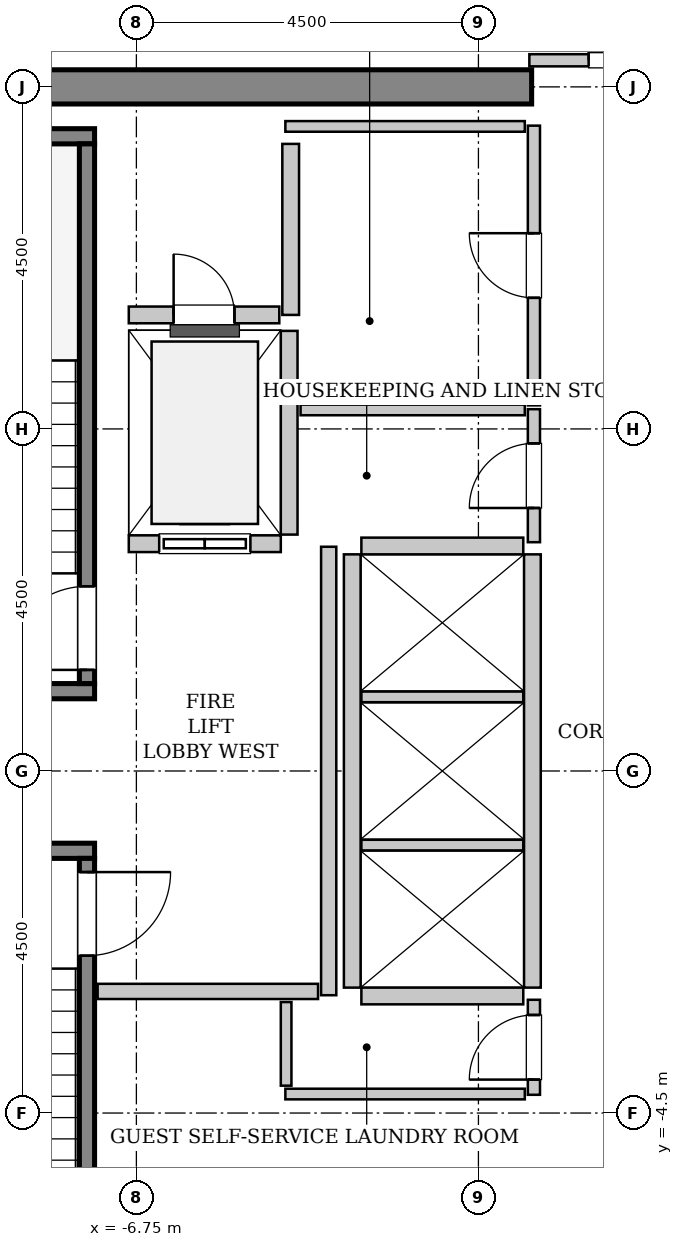
"""IFC4 building model, lengths in metres.
Left out: names, types, materials, properties, quantities, classifications, styles, units other than length and angle.
Written with IfcOpenShell. Run it as: python <this file> out.ifc"""

import sys

from ifc_helpers import new_model, si_unit, direction, frame, frame_2d, origin, place, context, subcontext, project, spatial, rectangle, extrude, source, transform, mapped, element, fill, save


model = new_model("IFC4")
c1 = context("Model", 3, precision=1e-05, world=origin(), true_north=direction((0.0, 1.0)))
c2 = subcontext(c1, "Body", "Model", "MODEL_VIEW")
j1 = project(units=[si_unit("LENGTHUNIT", "METRE"), si_unit("PLANEANGLEUNIT", "RADIAN")], contexts=[c1])
p1 = place(None, origin())
s1 = spatial("IfcSite", under=j1, at=p1, CompositionType="ELEMENT")
p2 = place(p1, origin())
s2 = spatial("IfcBuilding", under=s1, at=p2, CompositionType="ELEMENT")
p3 = place(p2, frame((0.0, 0.0, 252.2)))
s3 = spatial("IfcBuildingStorey", under=s2, at=p3, CompositionType="ELEMENT", Elevation=252.2)
m1 = source(origin(), c2, "Body", "SweptSolid", [
    extrude(rectangle(XDim=9.925, YDim=0.45, at=frame_2d((4.962, 0.0))), origin(), (0.0, 0.0, 1.0), 3.8),
])
p4 = place(p3, frame((-11.475, 9.0, 0.0), z_axis=(0.0, 0.0, 1.0), x_axis=(1.0, 0.0, 0.0)))
e1 = element("IfcWall", 1, at=p4, inside=s3, PredefinedType="SHEAR", context=c2, shape_type="MappedRepresentation", body=[
    mapped(m1, transform((0.0, 0.0, 0.0), x_axis=(1.0, 0.0, 0.0), y_axis=(0.0, 1.0, 0.0), z_axis=(0.0, 0.0, 1.0), scale=1.0)),
])
m2 = source(origin(), c2, "Body", "SweptSolid", [
    extrude(rectangle(XDim=3.4, YDim=0.2, at=frame_2d((1.7, 0.0))), origin(), (0.0, 0.0, 1.0), 3.8),
])
p5 = place(p3, frame((-7.3, 1.05, 0.0), z_axis=(0.0, 0.0, 1.0), x_axis=(-1.0, 0.0, 0.0)))
e2 = element("IfcWall", 2, at=p5, inside=s3, PredefinedType="SOLIDWALL", context=c2, shape_type="MappedRepresentation", body=[
    mapped(m2, transform((0.0, 0.0, 0.0), x_axis=(1.0, 0.0, 0.0), y_axis=(0.0, 1.0, 0.0), z_axis=(0.0, 0.0, 1.0), scale=1.0)),
])
m3 = source(origin(), c2, "Body", "SweptSolid", [
    extrude(rectangle(XDim=3.73, YDim=0.2, at=frame_2d((1.865, 0.0))), origin(), (0.0, 0.0, 1.0), 3.8),
])
p6 = place(p3, frame((-7.3, 8.35, 0.0), z_axis=(0.0, 0.0, 1.0), x_axis=(-1.0, 0.0, 0.0)))
e3 = element("IfcWall", 3, at=p6, inside=s3, PredefinedType="SOLIDWALL", context=c2, shape_type="MappedRepresentation", body=[
    mapped(m3, transform((0.0, 0.0, 0.0), x_axis=(1.0, 0.0, 0.0), y_axis=(0.0, 1.0, 0.0), z_axis=(0.0, 0.0, 1.0), scale=1.0)),
])
m4 = source(origin(), c2, "Body", "SweptSolid", [
    extrude(rectangle(XDim=7.1, YDim=0.2, at=frame_2d((3.55, 0.0))), origin(), (0.0, 0.0, 1.0), 3.8),
])
p7 = place(p3, frame((-7.4, 1.15, 0.0), z_axis=(0.0, 0.0, 1.0), x_axis=(0.0, 1.0, 0.0)))
e4 = element("IfcWall", 4, at=p7, inside=s3, PredefinedType="SOLIDWALL", context=c2, shape_type="MappedRepresentation", body=[
    mapped(m4, transform((0.0, 0.0, 0.0), x_axis=(1.0, 0.0, 0.0), y_axis=(0.0, 1.0, 0.0), z_axis=(0.0, 0.0, 1.0), scale=1.0)),
])
p8 = place(p7, frame((0.18, 0.0, 0.0)))
e5 = element("IfcOpeningElement", 5, at=p8, cuts=e4, PredefinedType="OPENING", context=c2, shape_type="SweptSolid", body=[
    extrude(rectangle(XDim=1.1, YDim=2.15, at=frame_2d((0.55, 1.075))), frame((0.0, 0.11, 0.0), z_axis=(0.0, -1.0, 0.0), x_axis=(1.0, 0.0, 0.0)), (0.0, 0.0, 1.0), 0.22),
])
p9 = place(p3, frame((-10.7, -1.05, 0.0), z_axis=(0.0, 0.0, 1.0), x_axis=(1.0, 0.0, 0.0)))
e6 = element("IfcWall", 6, at=p9, inside=s3, PredefinedType="SOLIDWALL", context=c2, shape_type="MappedRepresentation", body=[
    mapped(m2, transform((0.0, 0.0, 0.0), x_axis=(1.0, 0.0, 0.0), y_axis=(0.0, 1.0, 0.0), z_axis=(0.0, 0.0, 1.0), scale=1.0)),
])
p10 = place(p3, frame((-7.4, -1.15, 0.0), z_axis=(0.0, 0.0, 1.0), x_axis=(0.0, -1.0, 0.0)))
e7 = element("IfcWall", 7, at=p10, inside=s3, PredefinedType="SOLIDWALL", context=c2, shape_type="MappedRepresentation", body=[
    mapped(m4, transform((0.0, 0.0, 0.0), x_axis=(1.0, 0.0, 0.0), y_axis=(0.0, 1.0, 0.0), z_axis=(0.0, 0.0, 1.0), scale=1.0)),
])
p11 = place(p10, frame((0.18, 0.0, 0.0)))
e8 = element("IfcOpeningElement", 8, at=p11, cuts=e7, PredefinedType="OPENING", context=c2, shape_type="SweptSolid", body=[
    extrude(rectangle(XDim=1.1, YDim=2.15, at=frame_2d((0.55, 1.075))), frame((0.0, 0.11, 0.0), z_axis=(0.0, -1.0, 0.0), x_axis=(1.0, 0.0, 0.0)), (0.0, 0.0, 1.0), 0.22),
])
m5 = source(origin(), c2, "Body", "SweptSolid", [
    extrude(rectangle(XDim=2.0, YDim=0.22, at=frame_2d((1.0, 0.0))), origin(), (0.0, 0.0, 1.0), 3.535),
])
p12 = place(p3, frame((-6.85, 2.99, 0.0), z_axis=(0.0, 0.0, 1.0), x_axis=(1.0, 0.0, 0.0)))
e9 = element("IfcWall", 9, at=p12, inside=s3, PredefinedType="SOLIDWALL", context=c2, shape_type="MappedRepresentation", body=[
    mapped(m5, transform((0.0, 0.0, 0.0), x_axis=(1.0, 0.0, 0.0), y_axis=(0.0, 1.0, 0.0), z_axis=(0.0, 0.0, 1.0), scale=1.0)),
])
p13 = place(p12, frame((0.4, 0.0, 0.0)))
e10 = element("IfcOpeningElement", 10, at=p13, cuts=e9, PredefinedType="OPENING", context=c2, shape_type="SweptSolid", body=[
    extrude(rectangle(XDim=1.2, YDim=2.2, at=frame_2d((0.6, 1.1))), frame((0.0, 0.12, 0.0), z_axis=(0.0, -1.0, 0.0), x_axis=(1.0, 0.0, 0.0)), (0.0, 0.0, 1.0), 0.24),
])
m6 = source(origin(), c2, "Body", "SweptSolid", [
    extrude(rectangle(XDim=2.68, YDim=0.22, at=frame_2d((1.34, 0.0))), origin(), (0.0, 0.0, 1.0), 3.535),
])
p14 = place(p3, frame((-4.74, 3.11, 0.0), z_axis=(0.0, 0.0, 1.0), x_axis=(0.0, 1.0, 0.0)))
e11 = element("IfcWall", 11, at=p14, inside=s3, PredefinedType="SOLIDWALL", context=c2, shape_type="MappedRepresentation", body=[
    mapped(m6, transform((0.0, 0.0, 0.0), x_axis=(1.0, 0.0, 0.0), y_axis=(0.0, 1.0, 0.0), z_axis=(0.0, 0.0, 1.0), scale=1.0)),
])
m7 = source(origin(), c2, "Body", "SweptSolid", [
    extrude(rectangle(XDim=5.7, YDim=0.22, at=frame_2d((2.85, 0.0))), origin(), (0.0, 0.0, 1.0), 3.535),
])
for number, where, z_axis, x_axis in (
    (12, (-1.54, -2.85, 0.0), (0.0, 0.0, 1.0), (0.0, 1.0, 0.0)),
    (13, (-3.91, 2.85, 0.0), (0.0, 0.0, 1.0), (0.0, -1.0, 0.0)),
):
    element("IfcWall", number, at=place(p3, frame(where, z_axis=z_axis, x_axis=x_axis)), inside=s3, PredefinedType="SOLIDWALL", context=c2, shape_type="MappedRepresentation", body=[
        mapped(m7, transform((0.0, 0.0, 0.0), x_axis=(1.0, 0.0, 0.0), y_axis=(0.0, 1.0, 0.0), z_axis=(0.0, 0.0, 1.0), scale=1.0)),
    ])
m8 = source(origin(), c2, "Body", "SweptSolid", [
    extrude(rectangle(XDim=2.13, YDim=0.22, at=frame_2d((1.065, 0.0))), origin(), (0.0, 0.0, 1.0), 3.535),
])
p15 = place(p3, frame((-3.79, -2.96, 0.0), z_axis=(0.0, 0.0, 1.0), x_axis=(1.0, 0.0, 0.0)))
e14 = element("IfcWall", 14, at=p15, inside=s3, PredefinedType="SOLIDWALL", context=c2, shape_type="MappedRepresentation", body=[
    mapped(m8, transform((0.0, 0.0, 0.0), x_axis=(1.0, 0.0, 0.0), y_axis=(0.0, 1.0, 0.0), z_axis=(0.0, 0.0, 1.0), scale=1.0)),
])
m9 = source(origin(), c2, "Body", "SweptSolid", [
    extrude(rectangle(XDim=2.13, YDim=0.14, at=frame_2d((1.065, 0.0))), origin(), (0.0, 0.0, 1.0), 3.535),
])
for number, where, z_axis, x_axis in (
    (15, (-3.79, -0.975, 0.0), (0.0, 0.0, 1.0), (1.0, 0.0, 0.0)),
    (16, (-3.79, 0.975, 0.0), (0.0, 0.0, 1.0), (1.0, 0.0, 0.0)),
):
    element("IfcWall", number, at=place(p3, frame(where, z_axis=z_axis, x_axis=x_axis)), inside=s3, PredefinedType="PARTITIONING", context=c2, shape_type="MappedRepresentation", body=[
        mapped(m9, transform((0.0, 0.0, 0.0), x_axis=(1.0, 0.0, 0.0), y_axis=(0.0, 1.0, 0.0), z_axis=(0.0, 0.0, 1.0), scale=1.0)),
    ])
p16 = place(p3, frame((-1.66, 2.96, 0.0), z_axis=(0.0, 0.0, 1.0), x_axis=(-1.0, 0.0, 0.0)))
e17 = element("IfcWall", 17, at=p16, inside=s3, PredefinedType="SOLIDWALL", context=c2, shape_type="MappedRepresentation", body=[
    mapped(m8, transform((0.0, 0.0, 0.0), x_axis=(1.0, 0.0, 0.0), y_axis=(0.0, 1.0, 0.0), z_axis=(0.0, 0.0, 1.0), scale=1.0)),
])
m10 = source(origin(), c2, "Body", "SweptSolid", [
    extrude(rectangle(XDim=2.25, YDim=0.22, at=frame_2d((1.125, 0.0))), origin(), (0.0, 0.0, 1.0), 3.535),
])
p17 = place(p3, frame((-4.72, 6.0, 0.0), z_axis=(0.0, 0.0, 1.0), x_axis=(0.0, 1.0, 0.0)))
e18 = element("IfcWall", 18, at=p17, inside=s3, PredefinedType="SOLIDWALL", context=c2, shape_type="MappedRepresentation", body=[
    mapped(m10, transform((0.0, 0.0, 0.0), x_axis=(1.0, 0.0, 0.0), y_axis=(0.0, 1.0, 0.0), z_axis=(0.0, 0.0, 1.0), scale=1.0)),
])
m11 = source(origin(), c2, "Body", "SweptSolid", [
    extrude(rectangle(XDim=1.98, YDim=0.22, at=frame_2d((0.99, 0.0))), origin(), (0.0, 0.0, 1.0), 3.535),
])
p18 = place(p3, frame((-6.85, 6.0, 0.0), z_axis=(0.0, 0.0, 1.0), x_axis=(1.0, 0.0, 0.0)))
e19 = element("IfcWall", 19, at=p18, inside=s3, PredefinedType="SOLIDWALL", context=c2, shape_type="MappedRepresentation", body=[
    mapped(m11, transform((0.0, 0.0, 0.0), x_axis=(1.0, 0.0, 0.0), y_axis=(0.0, 1.0, 0.0), z_axis=(0.0, 0.0, 1.0), scale=1.0)),
])
p19 = place(p18, frame((0.59, 0.0, 0.0)))
e20 = element("IfcOpeningElement", 20, at=p19, cuts=e19, PredefinedType="OPENING", context=c2, shape_type="SweptSolid", body=[
    extrude(rectangle(XDim=0.8, YDim=2.0, at=frame_2d((0.4, 1.0))), frame((0.0, 0.12, 0.0), z_axis=(0.0, -1.0, 0.0), x_axis=(1.0, 0.0, 0.0)), (0.0, 0.0, 1.0), 0.24),
])
m12 = source(origin(), c2, "Body", "SweptSolid", [
    extrude(rectangle(XDim=5.9, YDim=0.2, at=frame_2d((2.95, 0.0))), origin(), (0.0, 0.0, 1.0), 3.535),
])
p20 = place(p3, frame((-4.22, -2.95, 0.0), z_axis=(0.0, 0.0, 1.0), x_axis=(0.0, 1.0, 0.0)))
e21 = element("IfcWall", 21, at=p20, inside=s3, PredefinedType="PARTITIONING", context=c2, shape_type="MappedRepresentation", body=[
    mapped(m12, transform((0.0, 0.0, 0.0), x_axis=(1.0, 0.0, 0.0), y_axis=(0.0, 1.0, 0.0), z_axis=(0.0, 0.0, 1.0), scale=1.0)),
])
m13 = source(origin(), c2, "Body", "SweptSolid", [
    extrude(rectangle(XDim=2.9, YDim=0.2, at=frame_2d((1.45, 0.0))), origin(), (0.0, 0.0, 1.0), 3.535),
])
p21 = place(p3, frame((-7.26, -2.9, 0.0), z_axis=(0.0, 0.0, 1.0), x_axis=(1.0, 0.0, 0.0)))
e22 = element("IfcWall", 22, at=p21, inside=s3, PredefinedType="PARTITIONING", context=c2, shape_type="MappedRepresentation", body=[
    mapped(m13, transform((0.0, 0.0, 0.0), x_axis=(1.0, 0.0, 0.0), y_axis=(0.0, 1.0, 0.0), z_axis=(0.0, 0.0, 1.0), scale=1.0)),
])
m14 = source(origin(), c2, "Body", "SweptSolid", [
    extrude(rectangle(XDim=3.16, YDim=0.16, at=frame_2d((1.58, 0.0))), origin(), (0.0, 0.0, 1.0), 2.625),
])
p22 = place(p3, frame((-1.58, 9.35, 0.0), z_axis=(0.0, 0.0, 1.0), x_axis=(1.0, 0.0, 0.0)))
e23 = element("IfcWall", 23, at=p22, inside=s3, PredefinedType="PARTITIONING", context=c2, shape_type="MappedRepresentation", body=[
    mapped(m14, transform((0.0, 0.0, 0.0), x_axis=(1.0, 0.0, 0.0), y_axis=(0.0, 1.0, 0.0), z_axis=(0.0, 0.0, 1.0), scale=1.0)),
])
p23 = place(p22, frame((0.78, 0.0, 0.0)))
e24 = element("IfcOpeningElement", 24, at=p23, cuts=e23, PredefinedType="OPENING", context=c2, shape_type="SweptSolid", body=[
    extrude(rectangle(XDim=1.6, YDim=2.3, at=frame_2d((0.8, 1.15))), frame((0.0, 0.09, 0.0), z_axis=(0.0, -1.0, 0.0), x_axis=(1.0, 0.0, 0.0)), (0.0, 0.0, 1.0), 0.18),
])
m15 = source(origin(), c2, "Body", "SweptSolid", [
    extrude(rectangle(XDim=1.75, YDim=0.16, at=frame_2d((0.875, 0.0))), origin(), (0.0, 0.0, 1.0), 3.535),
])
p24 = place(p3, frame((-1.52, 3.01, 0.0), z_axis=(0.0, 0.0, 1.0), x_axis=(0.0, 1.0, 0.0)))
e25 = element("IfcWall", 25, at=p24, inside=s3, PredefinedType="PARTITIONING", context=c2, shape_type="MappedRepresentation", body=[
    mapped(m15, transform((0.0, 0.0, 0.0), x_axis=(1.0, 0.0, 0.0), y_axis=(0.0, 1.0, 0.0), z_axis=(0.0, 0.0, 1.0), scale=1.0)),
])
p25 = place(p24, frame((0.45, 0.0, 0.0)))
e26 = element("IfcOpeningElement", 26, at=p25, cuts=e25, PredefinedType="OPENING", context=c2, shape_type="SweptSolid", body=[
    extrude(rectangle(XDim=0.85, YDim=2.1, at=frame_2d((0.425, 1.05))), frame((0.0, 0.09, 0.0), z_axis=(0.0, -1.0, 0.0), x_axis=(1.0, 0.0, 0.0)), (0.0, 0.0, 1.0), 0.18),
])
m16 = source(origin(), c2, "Body", "SweptSolid", [
    extrude(rectangle(XDim=2.95, YDim=0.14, at=frame_2d((1.475, 0.0))), origin(), (0.0, 0.0, 1.0), 3.535),
])
p26 = place(p3, frame((-4.59, 4.75, 0.0), z_axis=(0.0, 0.0, 1.0), x_axis=(1.0, 0.0, 0.0)))
e27 = element("IfcWall", 27, at=p26, inside=s3, PredefinedType="PARTITIONING", context=c2, shape_type="MappedRepresentation", body=[
    mapped(m16, transform((0.0, 0.0, 0.0), x_axis=(1.0, 0.0, 0.0), y_axis=(0.0, 1.0, 0.0), z_axis=(0.0, 0.0, 1.0), scale=1.0)),
])
m17 = source(origin(), c2, "Body", "SweptSolid", [
    extrude(rectangle(XDim=3.68, YDim=0.16, at=frame_2d((1.84, 0.0))), origin(), (0.0, 0.0, 1.0), 3.535),
])
p27 = place(p3, frame((-1.52, 4.81, 0.0), z_axis=(0.0, 0.0, 1.0), x_axis=(0.0, 1.0, 0.0)))
e28 = element("IfcWall", 28, at=p27, inside=s3, PredefinedType="PARTITIONING", context=c2, shape_type="MappedRepresentation", body=[
    mapped(m17, transform((0.0, 0.0, 0.0), x_axis=(1.0, 0.0, 0.0), y_axis=(0.0, 1.0, 0.0), z_axis=(0.0, 0.0, 1.0), scale=1.0)),
])
p28 = place(p27, frame((1.415, 0.0, 0.0)))
e29 = element("IfcOpeningElement", 29, at=p28, cuts=e28, PredefinedType="OPENING", context=c2, shape_type="SweptSolid", body=[
    extrude(rectangle(XDim=0.85, YDim=2.1, at=frame_2d((0.425, 1.05))), frame((0.0, 0.09, 0.0), z_axis=(0.0, -1.0, 0.0), x_axis=(1.0, 0.0, 0.0)), (0.0, 0.0, 1.0), 0.18),
])
m18 = source(origin(), c2, "Body", "SweptSolid", [
    extrude(rectangle(XDim=3.15, YDim=0.14, at=frame_2d((1.575, 0.0))), origin(), (0.0, 0.0, 1.0), 3.535),
])
p29 = place(p3, frame((-4.79, 8.48, 0.0), z_axis=(0.0, 0.0, 1.0), x_axis=(1.0, 0.0, 0.0)))
e30 = element("IfcWall", 30, at=p29, inside=s3, PredefinedType="PARTITIONING", context=c2, shape_type="MappedRepresentation", body=[
    mapped(m18, transform((0.0, 0.0, 0.0), x_axis=(1.0, 0.0, 0.0), y_axis=(0.0, 1.0, 0.0), z_axis=(0.0, 0.0, 1.0), scale=1.0)),
])
m19 = source(origin(), c2, "Body", "SweptSolid", [
    extrude(rectangle(XDim=1.25, YDim=0.16, at=frame_2d((0.625, 0.0))), origin(), (0.0, 0.0, 1.0), 3.535),
])
p30 = place(p3, frame((-1.52, -4.26, 0.0), z_axis=(0.0, 0.0, 1.0), x_axis=(0.0, 1.0, 0.0)))
e31 = element("IfcWall", 31, at=p30, inside=s3, PredefinedType="PARTITIONING", context=c2, shape_type="MappedRepresentation", body=[
    mapped(m19, transform((0.0, 0.0, 0.0), x_axis=(1.0, 0.0, 0.0), y_axis=(0.0, 1.0, 0.0), z_axis=(0.0, 0.0, 1.0), scale=1.0)),
])
p31 = place(p30, frame((0.2, 0.0, 0.0)))
e32 = element("IfcOpeningElement", 32, at=p31, cuts=e31, PredefinedType="OPENING", context=c2, shape_type="SweptSolid", body=[
    extrude(rectangle(XDim=0.85, YDim=2.1, at=frame_2d((0.425, 1.05))), frame((0.0, 0.09, 0.0), z_axis=(0.0, -1.0, 0.0), x_axis=(1.0, 0.0, 0.0)), (0.0, 0.0, 1.0), 0.18),
])
p32 = place(p3, frame((-4.79, -4.25, 0.0), z_axis=(0.0, 0.0, 1.0), x_axis=(1.0, 0.0, 0.0)))
e33 = element("IfcWall", 33, at=p32, inside=s3, PredefinedType="PARTITIONING", context=c2, shape_type="MappedRepresentation", body=[
    mapped(m18, transform((0.0, 0.0, 0.0), x_axis=(1.0, 0.0, 0.0), y_axis=(0.0, 1.0, 0.0), z_axis=(0.0, 0.0, 1.0), scale=1.0)),
])
m20 = source(origin(), c2, "Body", "SweptSolid", [
    extrude(rectangle(XDim=1.1, YDim=0.14, at=frame_2d((0.55, 0.0))), origin(), (0.0, 0.0, 1.0), 3.535),
])
p33 = place(p3, frame((-4.78, -4.14, 0.0), z_axis=(0.0, 0.0, 1.0), x_axis=(0.0, 1.0, 0.0)))
e34 = element("IfcWall", 34, at=p33, inside=s3, PredefinedType="PARTITIONING", context=c2, shape_type="MappedRepresentation", body=[
    mapped(m20, transform((0.0, 0.0, 0.0), x_axis=(1.0, 0.0, 0.0), y_axis=(0.0, 1.0, 0.0), z_axis=(0.0, 0.0, 1.0), scale=1.0)),
])
m21 = source(origin(), c2, "Body", "SweptSolid", [
    extrude(rectangle(XDim=1.1, YDim=2.15, at=frame_2d((0.55, 1.075))), frame((0.0, 0.025, 0.0), z_axis=(0.0, -1.0, 0.0), x_axis=(1.0, 0.0, 0.0)), (0.0, 0.0, 1.0), 0.05),
])
p34 = place(p8, origin())
e35 = element("IfcDoor", 35, at=p34, inside=s3, OperationType="SINGLE_SWING_LEFT", PredefinedType="DOOR", context=c2, shape_type="MappedRepresentation", body=[
    mapped(m21, transform((0.0, 0.0, 0.0), x_axis=(1.0, 0.0, 0.0), y_axis=(0.0, 1.0, 0.0), z_axis=(0.0, 0.0, 1.0), scale=1.0)),
])
fill(e5, e35)
p35 = place(p11, origin())
e36 = element("IfcDoor", 36, at=p35, inside=s3, OperationType="SINGLE_SWING_LEFT", PredefinedType="DOOR", context=c2, shape_type="MappedRepresentation", body=[
    mapped(m21, transform((0.0, 0.0, 0.0), x_axis=(1.0, 0.0, 0.0), y_axis=(0.0, 1.0, 0.0), z_axis=(0.0, 0.0, 1.0), scale=1.0)),
])
fill(e8, e36)
m22 = source(origin(), c2, "Body", "SweptSolid", [
    extrude(rectangle(XDim=1.2, YDim=2.2, at=frame_2d((0.6, 1.1))), frame((0.0, 0.025, 0.0), z_axis=(0.0, -1.0, 0.0), x_axis=(1.0, 0.0, 0.0)), (0.0, 0.0, 1.0), 0.05),
])
p36 = place(p13, origin())
e37 = element("IfcDoor", 37, at=p36, inside=s3, OperationType="SLIDING_TO_LEFT", PredefinedType="DOOR", context=c2, shape_type="MappedRepresentation", body=[
    mapped(m22, transform((0.0, 0.0, 0.0), x_axis=(1.0, 0.0, 0.0), y_axis=(0.0, 1.0, 0.0), z_axis=(0.0, 0.0, 1.0), scale=1.0)),
])
fill(e10, e37)
m23 = source(origin(), c2, "Body", "SweptSolid", [
    extrude(rectangle(XDim=0.8, YDim=2.0, at=frame_2d((0.4, 1.0))), frame((0.0, 0.025, 0.0), z_axis=(0.0, -1.0, 0.0), x_axis=(1.0, 0.0, 0.0)), (0.0, 0.0, 1.0), 0.05),
])
p37 = place(p19, origin())
e38 = element("IfcDoor", 38, at=p37, inside=s3, OperationType="SINGLE_SWING_LEFT", PredefinedType="TRAPDOOR", context=c2, shape_type="MappedRepresentation", body=[
    mapped(m23, transform((0.0, 0.0, 0.0), x_axis=(1.0, 0.0, 0.0), y_axis=(0.0, 1.0, 0.0), z_axis=(0.0, 0.0, 1.0), scale=1.0)),
])
fill(e20, e38)
m24 = source(origin(), c2, "Body", "SweptSolid", [
    extrude(rectangle(XDim=1.6, YDim=2.3, at=frame_2d((0.8, 1.15))), frame((0.0, 0.025, 0.0), z_axis=(0.0, -1.0, 0.0), x_axis=(1.0, 0.0, 0.0)), (0.0, 0.0, 1.0), 0.05),
])
p38 = place(p23, origin())
e39 = element("IfcDoor", 39, at=p38, inside=s3, OperationType="DOUBLE_DOOR_SINGLE_SWING", PredefinedType="DOOR", context=c2, shape_type="MappedRepresentation", body=[
    mapped(m24, transform((0.0, 0.0, 0.0), x_axis=(1.0, 0.0, 0.0), y_axis=(0.0, 1.0, 0.0), z_axis=(0.0, 0.0, 1.0), scale=1.0)),
])
fill(e24, e39)
m25 = source(origin(), c2, "Body", "SweptSolid", [
    extrude(rectangle(XDim=0.85, YDim=2.1, at=frame_2d((0.425, 1.05))), frame((0.0, 0.025, 0.0), z_axis=(0.0, -1.0, 0.0), x_axis=(1.0, 0.0, 0.0)), (0.0, 0.0, 1.0), 0.05),
])
p39 = place(p25, origin())
e40 = element("IfcDoor", 40, at=p39, inside=s3, OperationType="SINGLE_SWING_LEFT", PredefinedType="DOOR", context=c2, shape_type="MappedRepresentation", body=[
    mapped(m25, transform((0.0, 0.0, 0.0), x_axis=(1.0, 0.0, 0.0), y_axis=(0.0, 1.0, 0.0), z_axis=(0.0, 0.0, 1.0), scale=1.0)),
])
fill(e26, e40)
p40 = place(p28, origin())
e41 = element("IfcDoor", 41, at=p40, inside=s3, OperationType="SINGLE_SWING_RIGHT", PredefinedType="DOOR", context=c2, shape_type="MappedRepresentation", body=[
    mapped(m25, transform((0.0, 0.0, 0.0), x_axis=(1.0, 0.0, 0.0), y_axis=(0.0, 1.0, 0.0), z_axis=(0.0, 0.0, 1.0), scale=1.0)),
])
fill(e29, e41)
p41 = place(p31, origin())
e42 = element("IfcDoor", 42, at=p41, inside=s3, OperationType="SINGLE_SWING_LEFT", PredefinedType="DOOR", context=c2, shape_type="MappedRepresentation", body=[
    mapped(m25, transform((0.0, 0.0, 0.0), x_axis=(1.0, 0.0, 0.0), y_axis=(0.0, 1.0, 0.0), z_axis=(0.0, 0.0, 1.0), scale=1.0)),
])
fill(e32, e42)
save(model, sys.argv[1])
